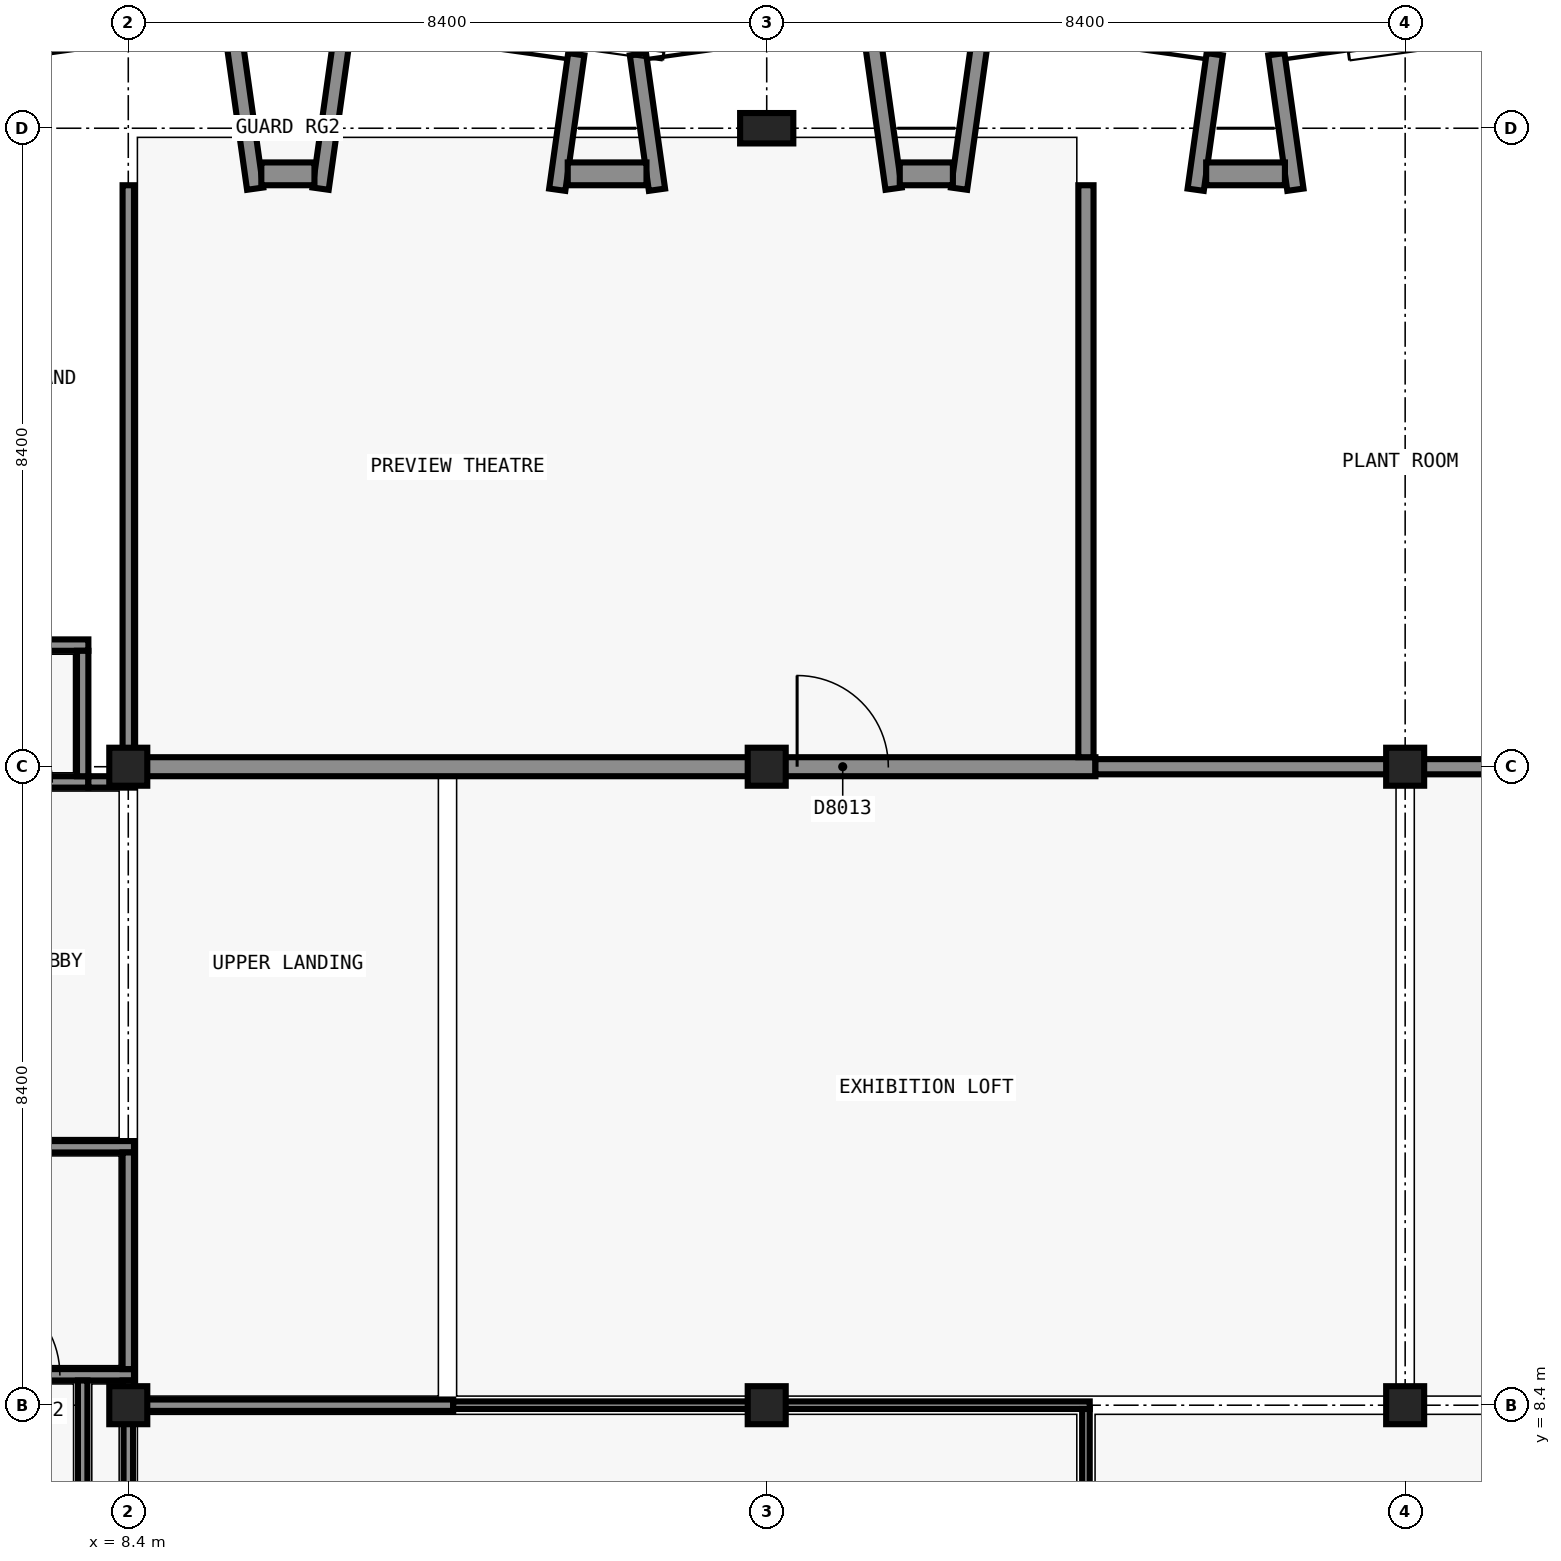
"""IFC4 building model, lengths in metres.
Left out: names, types, materials, properties, quantities, classifications, styles, units other than length and angle.
Written with IfcOpenShell. Run it as: python <this file> out.ifc"""

import sys

from ifc_helpers import new_model, si_unit, direction, frame, frame_2d, origin, origin_2d, place, context, subcontext, project, spatial, rectangle, extrude, element, fill, save


model = new_model("IFC4")
c1 = context("Model", 3, precision=1e-05, world=origin(), true_north=direction((0.0, 1.0)))
c2 = subcontext(c1, "Body", "Model", "MODEL_VIEW")
j1 = project(units=[si_unit("LENGTHUNIT", "METRE"), si_unit("PLANEANGLEUNIT", "RADIAN")], contexts=[c1])
p1 = place(None, origin())
s1 = spatial("IfcSite", under=j1, at=p1, CompositionType="ELEMENT")
p2 = place(p1, origin())
s2 = spatial("IfcBuilding", under=s1, at=p2, CompositionType="ELEMENT")
p3 = place(p2, frame((0.0, 0.0, 38.1)))
s3 = spatial("IfcBuildingStorey", under=s2, at=p3, CompositionType="ELEMENT", Elevation=38.1)
for number, where, z_axis, x_axis in (
    (1, (8.4, 8.4, 0.0), (0.0, 0.0, 1.0), (1.0, 0.0, 0.0)),
    (2, (8.4, 16.8, 0.0), (0.0, 0.0, 1.0), (1.0, 0.0, 0.0)),
    (3, (16.8, 8.4, 0.0), (0.0, 0.0, 1.0), (1.0, 0.0, 0.0)),
    (4, (16.8, 16.8, 0.0), (0.0, 0.0, 1.0), (1.0, 0.0, 0.0)),
):
    element("IfcColumn", number, at=place(p3, frame(where, z_axis=z_axis, x_axis=x_axis)), inside=s3, PredefinedType="COLUMN", context=c2, shape_type="SweptSolid", body=[
        extrude(rectangle(XDim=0.5, YDim=0.5, at=origin_2d()), origin(), (0.0, 0.0, 1.0), 4.5),
    ])
p4 = place(p3, frame((16.8, 25.2, 0.0), z_axis=(0.0, 0.0, 1.0), x_axis=(1.0, 0.0, 0.0)))
e5 = element("IfcColumn", 5, at=p4, inside=s3, PredefinedType="COLUMN", context=c2, shape_type="SweptSolid", body=[
    extrude(rectangle(XDim=0.7, YDim=0.4, at=origin_2d()), origin(), (0.0, 0.0, 1.0), 4.5),
])
for number, where, z_axis, x_axis in (
    (6, (25.2, 8.4, 0.0), (0.0, 0.0, 1.0), (1.0, 0.0, 0.0)),
    (7, (25.2, 16.8, 0.0), (0.0, 0.0, 1.0), (1.0, 0.0, 0.0)),
):
    element("IfcColumn", number, at=place(p3, frame(where, z_axis=z_axis, x_axis=x_axis)), inside=s3, PredefinedType="COLUMN", context=c2, shape_type="SweptSolid", body=[
        extrude(rectangle(XDim=0.5, YDim=0.5, at=origin_2d()), origin(), (0.0, 0.0, 1.0), 4.5),
    ])
for number, where, z_axis, x_axis in (
    (8, (10.069, 24.405, 0.0), (0.0, 0.0, 1.0), (-0.139, 0.99, 0.0)),
    (9, (10.931, 24.405, 0.0), (0.0, 0.0, 1.0), (0.139, 0.99, 0.0)),
):
    element("IfcWall", number, at=place(p3, frame(where, z_axis=z_axis, x_axis=x_axis)), inside=s3, PredefinedType="SOLIDWALL", context=c2, shape_type="SweptSolid", body=[
        extrude(rectangle(XDim=2.219, YDim=0.215, at=frame_2d((1.11, 0.0))), origin(), (0.0, 0.0, 1.0), 4.2),
    ])
for number, where, z_axis, x_axis in (
    (10, (14.044, 24.391, 0.0), (0.0, 0.0, 1.0), (0.139, 0.99, 0.0)),
    (11, (15.356, 24.391, 0.0), (0.0, 0.0, 1.0), (-0.139, 0.99, 0.0)),
):
    element("IfcWall", number, at=place(p3, frame(where, z_axis=z_axis, x_axis=x_axis)), inside=s3, PredefinedType="SOLIDWALL", context=c2, shape_type="SweptSolid", body=[
        extrude(rectangle(XDim=1.8, YDim=0.215, at=frame_2d((0.9, 0.0))), origin(), (0.0, 0.0, 1.0), 4.2),
    ])
p5 = place(p3, frame((18.469, 24.405, 0.0), z_axis=(0.0, 0.0, 1.0), x_axis=(-0.139249775508, 0.99025728981, 0.0)))
e12 = element("IfcWall", 12, at=p5, inside=s3, PredefinedType="SOLIDWALL", context=c2, shape_type="SweptSolid", body=[
    extrude(rectangle(XDim=2.22, YDim=0.215, at=frame_2d((1.11, 0.0))), origin(), (0.0, 0.0, 1.0), 4.2),
])
p6 = place(p3, frame((19.331, 24.405, 0.0), z_axis=(0.0, 0.0, 1.0), x_axis=(0.139141913905, 0.990272451295, 0.0)))
e13 = element("IfcWall", 13, at=p6, inside=s3, PredefinedType="SOLIDWALL", context=c2, shape_type="SweptSolid", body=[
    extrude(rectangle(XDim=2.219, YDim=0.215, at=frame_2d((1.11, 0.0))), origin(), (0.0, 0.0, 1.0), 4.2),
])
for number, where, z_axis, x_axis in (
    (14, (22.444, 24.391, 0.0), (0.0, 0.0, 1.0), (0.139, 0.99, 0.0)),
    (15, (23.756, 24.391, 0.0), (0.0, 0.0, 1.0), (-0.139, 0.99, 0.0)),
):
    element("IfcWall", number, at=place(p3, frame(where, z_axis=z_axis, x_axis=x_axis)), inside=s3, PredefinedType="SOLIDWALL", context=c2, shape_type="SweptSolid", body=[
        extrude(rectangle(XDim=1.8, YDim=0.215, at=frame_2d((0.9, 0.0))), origin(), (0.0, 0.0, 1.0), 4.2),
    ])
p7 = place(p3, frame((10.15, 24.6, 0.0), z_axis=(0.0, 0.0, 1.0), x_axis=(1.0, 0.0, 0.0)))
e16 = element("IfcWall", 16, at=p7, inside=s3, PredefinedType="SOLIDWALL", context=c2, shape_type="SweptSolid", body=[
    extrude(rectangle(XDim=0.699, YDim=0.3, at=frame_2d((0.35, 0.0))), origin(), (0.0, 0.0, 1.0), 4.2),
])
p8 = place(p3, frame((14.182, 24.6, 0.0), z_axis=(0.0, 0.0, 1.0), x_axis=(1.0, 0.0, 0.0)))
e17 = element("IfcWall", 17, at=p8, inside=s3, PredefinedType="SOLIDWALL", context=c2, shape_type="SweptSolid", body=[
    extrude(rectangle(XDim=1.036, YDim=0.3, at=frame_2d((0.518, 0.0))), origin(), (0.0, 0.0, 1.0), 4.2),
])
p9 = place(p3, frame((18.551, 24.6, 0.0), z_axis=(0.0, 0.0, 1.0), x_axis=(1.0, 0.0, 0.0)))
e18 = element("IfcWall", 18, at=p9, inside=s3, PredefinedType="SOLIDWALL", context=c2, shape_type="SweptSolid", body=[
    extrude(rectangle(XDim=0.699, YDim=0.3, at=frame_2d((0.35, 0.0))), origin(), (0.0, 0.0, 1.0), 4.2),
])
p10 = place(p3, frame((22.582, 24.6, 0.0), z_axis=(0.0, 0.0, 1.0), x_axis=(1.0, 0.0, 0.0)))
e19 = element("IfcWall", 19, at=p10, inside=s3, PredefinedType="SOLIDWALL", context=c2, shape_type="SweptSolid", body=[
    extrude(rectangle(XDim=1.036, YDim=0.3, at=frame_2d((0.518, 0.0))), origin(), (0.0, 0.0, 1.0), 4.2),
])
p11 = place(p3, frame((8.275, 16.8, 0.0), z_axis=(0.0, 0.0, 1.0), x_axis=(1.0, 0.0, 0.0)))
e20 = element("IfcWall", 20, at=p11, inside=s3, PredefinedType="PARTITIONING", context=c2, shape_type="SweptSolid", body=[
    extrude(rectangle(XDim=12.85, YDim=0.25, at=frame_2d((6.425, 0.0))), origin(), (0.0, 0.0, 1.0), 3.4),
])
p12 = place(p11, frame((8.925, 0.0, 0.0)))
e21 = element("IfcOpeningElement", 21, at=p12, cuts=e20, PredefinedType="OPENING", context=c2, shape_type="SweptSolid", body=[
    extrude(rectangle(XDim=1.2, YDim=2.1, at=frame_2d((0.6, 1.05))), frame((0.0, 0.135, 0.0), z_axis=(0.0, -1.0, 0.0), x_axis=(1.0, 0.0, 0.0)), (0.0, 0.0, 1.0), 0.27),
])
p13 = place(p3, frame((21.125, 16.8, 0.0), z_axis=(0.0, 0.0, 1.0), x_axis=(1.0, 0.0, 0.0)))
e22 = element("IfcWall", 22, at=p13, inside=s3, PredefinedType="SOLIDWALL", context=c2, shape_type="SweptSolid", body=[
    extrude(rectangle(XDim=11.575, YDim=0.2, at=frame_2d((5.788, 0.0))), origin(), (0.0, 0.0, 1.0), 3.4),
])
p14 = place(p13, frame((7.675, 0.0, 0.0)))
e23 = element("IfcOpeningElement", 23, at=p14, cuts=e22, PredefinedType="OPENING", context=c2, shape_type="SweptSolid", body=[
    extrude(rectangle(XDim=1.2, YDim=2.1, at=frame_2d((0.6, 1.05))), frame((0.0, 0.11, 0.0), z_axis=(0.0, -1.0, 0.0), x_axis=(1.0, 0.0, 0.0)), (0.0, 0.0, 1.0), 0.22),
])
p15 = place(p3, frame((21.0, 16.925, 0.0), z_axis=(0.0, 0.0, 1.0), x_axis=(0.0, 1.0, 0.0)))
e24 = element("IfcWall", 24, at=p15, inside=s3, PredefinedType="SOLIDWALL", context=c2, shape_type="SweptSolid", body=[
    extrude(rectangle(XDim=7.525, YDim=0.2, at=frame_2d((3.762, 0.0))), origin(), (0.0, 0.0, 1.0), 3.4),
])
p16 = place(p3, frame((8.325, 8.4, 0.0), z_axis=(0.0, 0.0, 1.0), x_axis=(1.0, 0.0, 0.0)))
e25 = element("IfcWall", 25, at=p16, inside=s3, PredefinedType="PARTITIONING", context=c2, shape_type="SweptSolid", body=[
    extrude(rectangle(XDim=4.35, YDim=0.15, at=frame_2d((2.175, 0.0))), origin(), (0.0, 0.0, 1.0), 3.4),
])
p17 = place(p3, frame((6.1, 16.6, 0.0), z_axis=(0.0, 0.0, 1.0), x_axis=(1.0, 0.0, 0.0)))
e26 = element("IfcWall", 26, at=p17, inside=s3, PredefinedType="PARTITIONING", context=c2, shape_type="SweptSolid", body=[
    extrude(rectangle(XDim=1.775, YDim=0.15, at=frame_2d((0.887, 0.0))), origin(), (0.0, 0.0, 1.0), 3.6),
])
p18 = place(p17, frame((0.3, 0.0, 0.0)))
e27 = element("IfcOpeningElement", 27, at=p18, cuts=e26, PredefinedType="OPENING", context=c2, shape_type="SweptSolid", body=[
    extrude(rectangle(XDim=1.0, YDim=2.1, at=frame_2d((0.5, 1.05))), frame((0.0, 0.085, 0.0), z_axis=(0.0, -1.0, 0.0), x_axis=(1.0, 0.0, 0.0)), (0.0, 0.0, 1.0), 0.17),
])
p19 = place(p3, frame((6.1, 8.8, 0.0), z_axis=(0.0, 0.0, 1.0), x_axis=(1.0, 0.0, 0.0)))
e28 = element("IfcWall", 28, at=p19, inside=s3, PredefinedType="SOLIDWALL", context=c2, shape_type="SweptSolid", body=[
    extrude(rectangle(XDim=2.375, YDim=0.15, at=frame_2d((1.188, 0.0))), origin(), (0.0, 0.0, 1.0), 3.4),
])
p20 = place(p19, frame((0.2, 0.0, 0.0)))
e29 = element("IfcOpeningElement", 29, at=p20, cuts=e28, PredefinedType="OPENING", context=c2, shape_type="SweptSolid", body=[
    extrude(rectangle(XDim=1.2, YDim=2.1, at=frame_2d((0.6, 1.05))), frame((0.0, 0.085, 0.0), z_axis=(0.0, -1.0, 0.0), x_axis=(1.0, 0.0, 0.0)), (0.0, 0.0, 1.0), 0.17),
])
p21 = place(p3, frame((3.3, 11.8, 0.0), z_axis=(0.0, 0.0, 1.0), x_axis=(1.0, 0.0, 0.0)))
e30 = element("IfcWall", 30, at=p21, inside=s3, PredefinedType="SOLIDWALL", context=c2, shape_type="SweptSolid", body=[
    extrude(rectangle(XDim=5.175, YDim=0.15, at=frame_2d((2.587, 0.0))), origin(), (0.0, 0.0, 1.0), 3.4),
])
p22 = place(p3, frame((7.875, 16.6, 0.0), z_axis=(0.0, 0.0, 1.0), x_axis=(1.0, 0.0, 0.0)))
e31 = element("IfcWall", 31, at=p22, inside=s3, PredefinedType="SOLIDWALL", context=c2, shape_type="SweptSolid", body=[
    extrude(rectangle(XDim=0.6, YDim=0.15, at=frame_2d((0.3, 0.0))), origin(), (0.0, 0.0, 1.0), 3.4),
])
p23 = place(p3, frame((6.1, 18.4, 0.0), z_axis=(0.0, 0.0, 1.0), x_axis=(1.0, 0.0, 0.0)))
e32 = element("IfcWall", 32, at=p23, inside=s3, PredefinedType="SOLIDWALL", context=c2, shape_type="SweptSolid", body=[
    extrude(rectangle(XDim=1.775, YDim=0.15, at=frame_2d((0.887, 0.0))), origin(), (0.0, 0.0, 1.0), 4.2),
])
p24 = place(p3, frame((8.4, 8.475, 0.0), z_axis=(0.0, 0.0, 1.0), x_axis=(0.0, 1.0, 0.0)))
e33 = element("IfcWall", 33, at=p24, inside=s3, PredefinedType="PARTITIONING", context=c2, shape_type="SweptSolid", body=[
    extrude(rectangle(XDim=0.25, YDim=0.15, at=frame_2d((0.125, 0.0))), origin(), (0.0, 0.0, 1.0), 3.4),
])
p25 = place(p3, frame((8.4, 8.875, 0.0), z_axis=(0.0, 0.0, 1.0), x_axis=(0.0, 1.0, 0.0)))
e34 = element("IfcWall", 34, at=p25, inside=s3, PredefinedType="SOLIDWALL", context=c2, shape_type="SweptSolid", body=[
    extrude(rectangle(XDim=2.85, YDim=0.15, at=frame_2d((1.425, 0.0))), origin(), (0.0, 0.0, 1.0), 3.4),
])
p26 = place(p3, frame((7.8, 16.675, 0.0), z_axis=(0.0, 0.0, 1.0), x_axis=(0.0, 1.0, 0.0)))
e35 = element("IfcWall", 35, at=p26, inside=s3, PredefinedType="SOLIDWALL", context=c2, shape_type="SweptSolid", body=[
    extrude(rectangle(XDim=1.65, YDim=0.15, at=frame_2d((0.825, 0.0))), origin(), (0.0, 0.0, 1.0), 3.6),
])
p27 = place(p3, frame((8.4, 16.925, 0.0), z_axis=(0.0, 0.0, 1.0), x_axis=(0.0, 1.0, 0.0)))
e36 = element("IfcWall", 36, at=p27, inside=s3, PredefinedType="SOLIDWALL", context=c2, shape_type="SweptSolid", body=[
    extrude(rectangle(XDim=7.525, YDim=0.15, at=frame_2d((3.762, 0.0))), origin(), (0.0, 0.0, 1.0), 3.4),
])
p28 = place(p3, frame((7.8, 7.062, 0.0), z_axis=(0.0, 0.0, 1.0), x_axis=(0.0, 1.0, 0.0)))
e37 = element("IfcWall", 37, at=p28, inside=s3, PredefinedType="PARTITIONING", context=c2, shape_type="SweptSolid", body=[
    extrude(rectangle(XDim=1.663, YDim=0.125, at=frame_2d((0.831, 0.0))), origin(), (0.0, 0.0, 1.0), 3.6),
])
p29 = place(p3, frame((8.4, 0.75, 0.0), z_axis=(0.0, 0.0, 1.0), x_axis=(0.0, 1.0, 0.0)))
e38 = element("IfcWall", 38, at=p29, inside=s3, PredefinedType="PARTITIONING", context=c2, shape_type="SweptSolid", body=[
    extrude(rectangle(XDim=7.575, YDim=0.125, at=frame_2d((3.788, 0.0))), origin(), (0.0, 0.0, 1.0), 3.4),
])
p30 = place(p3, frame((12.675, 8.4, 0.0), z_axis=(0.0, 0.0, 1.0), x_axis=(1.0, 0.0, 0.0)))
e39 = element("IfcWall", 39, at=p30, inside=s3, PredefinedType="PARTITIONING", context=c2, shape_type="SweptSolid", body=[
    extrude(rectangle(XDim=8.375, YDim=0.1, at=frame_2d((4.188, 0.0))), origin(), (0.0, 0.0, 1.0), 3.4),
])
p31 = place(p3, frame((21.0, 0.75, 0.0), z_axis=(0.0, 0.0, 1.0), x_axis=(0.0, 1.0, 0.0)))
e40 = element("IfcWall", 40, at=p31, inside=s3, PredefinedType="PARTITIONING", context=c2, shape_type="SweptSolid", body=[
    extrude(rectangle(XDim=7.6, YDim=0.1, at=frame_2d((3.8, 0.0))), origin(), (0.0, 0.0, 1.0), 3.4),
])
p32 = place(p31, frame((2.95, 0.0, 0.0)))
e41 = element("IfcOpeningElement", 41, at=p32, cuts=e40, PredefinedType="OPENING", context=c2, shape_type="SweptSolid", body=[
    extrude(rectangle(XDim=1.0, YDim=2.1, at=frame_2d((0.5, 1.05))), frame((0.0, 0.06, 0.0), z_axis=(0.0, -1.0, 0.0), x_axis=(1.0, 0.0, 0.0)), (0.0, 0.0, 1.0), 0.12),
])
p33 = place(p2, frame((0.0, 0.0, 42.6)))
p34 = place(p33, frame((11.351, 26.774, 0.0), z_axis=(0.0, 0.0, 1.0), x_axis=(0.990269446541, -0.139163297052, 0.0)))
p35 = place(p34, frame((2.935, 0.0, 0.6)))
p36 = place(p35, origin())
e42 = element("IfcWindow", 42, at=p36, inside=s3, PartitioningType="SINGLE_PANEL", PredefinedType="WINDOW", context=c2, shape_type="SweptSolid", body=[
    extrude(rectangle(XDim=1.2, YDim=1.8, at=frame_2d((0.6, 0.9))), frame((0.0, 0.03, 0.0), z_axis=(0.0, -1.0, 0.0), x_axis=(1.0, 0.0, 0.0)), (0.0, 0.0, 1.0), 0.06),
])
p37 = place(p33, frame((23.627, 26.082, 0.0), z_axis=(0.0, 0.0, 1.0), x_axis=(0.990268489117, 0.139170109801, 0.0)))
p38 = place(p37, frame((0.835, 0.0, 0.6)))
p39 = place(p38, origin())
e43 = element("IfcWindow", 43, at=p39, inside=s3, PartitioningType="SINGLE_PANEL", PredefinedType="WINDOW", context=c2, shape_type="SweptSolid", body=[
    extrude(rectangle(XDim=1.2, YDim=1.8, at=frame_2d((0.6, 0.9))), frame((0.0, 0.03, 0.0), z_axis=(0.0, -1.0, 0.0), x_axis=(1.0, 0.0, 0.0)), (0.0, 0.0, 1.0), 0.06),
])
p40 = place(p20, origin())
e44 = element("IfcDoor", 44, at=p40, inside=s3, OperationType="SINGLE_SWING_RIGHT", PredefinedType="DOOR", context=c2, shape_type="SweptSolid", body=[
    extrude(rectangle(XDim=1.2, YDim=2.1, at=frame_2d((0.6, 1.05))), frame((0.0, 0.025, 0.0), z_axis=(0.0, -1.0, 0.0), x_axis=(1.0, 0.0, 0.0)), (0.0, 0.0, 1.0), 0.05),
])
fill(e29, e44)
p41 = place(p12, origin())
e45 = element("IfcDoor", 45, at=p41, inside=s3, OperationType="SINGLE_SWING_RIGHT", PredefinedType="DOOR", context=c2, shape_type="SweptSolid", body=[
    extrude(rectangle(XDim=1.2, YDim=2.1, at=frame_2d((0.6, 1.05))), frame((0.0, 0.025, 0.0), z_axis=(0.0, -1.0, 0.0), x_axis=(1.0, 0.0, 0.0)), (0.0, 0.0, 1.0), 0.05),
])
fill(e21, e45)
p42 = place(p18, origin())
e46 = element("IfcDoor", 46, at=p42, inside=s3, OperationType="SINGLE_SWING_RIGHT", PredefinedType="DOOR", context=c2, shape_type="SweptSolid", body=[
    extrude(rectangle(XDim=1.0, YDim=2.1, at=frame_2d((0.5, 1.05))), frame((0.0, 0.025, 0.0), z_axis=(0.0, -1.0, 0.0), x_axis=(1.0, 0.0, 0.0)), (0.0, 0.0, 1.0), 0.05),
])
fill(e27, e46)
save(model, sys.argv[1])
